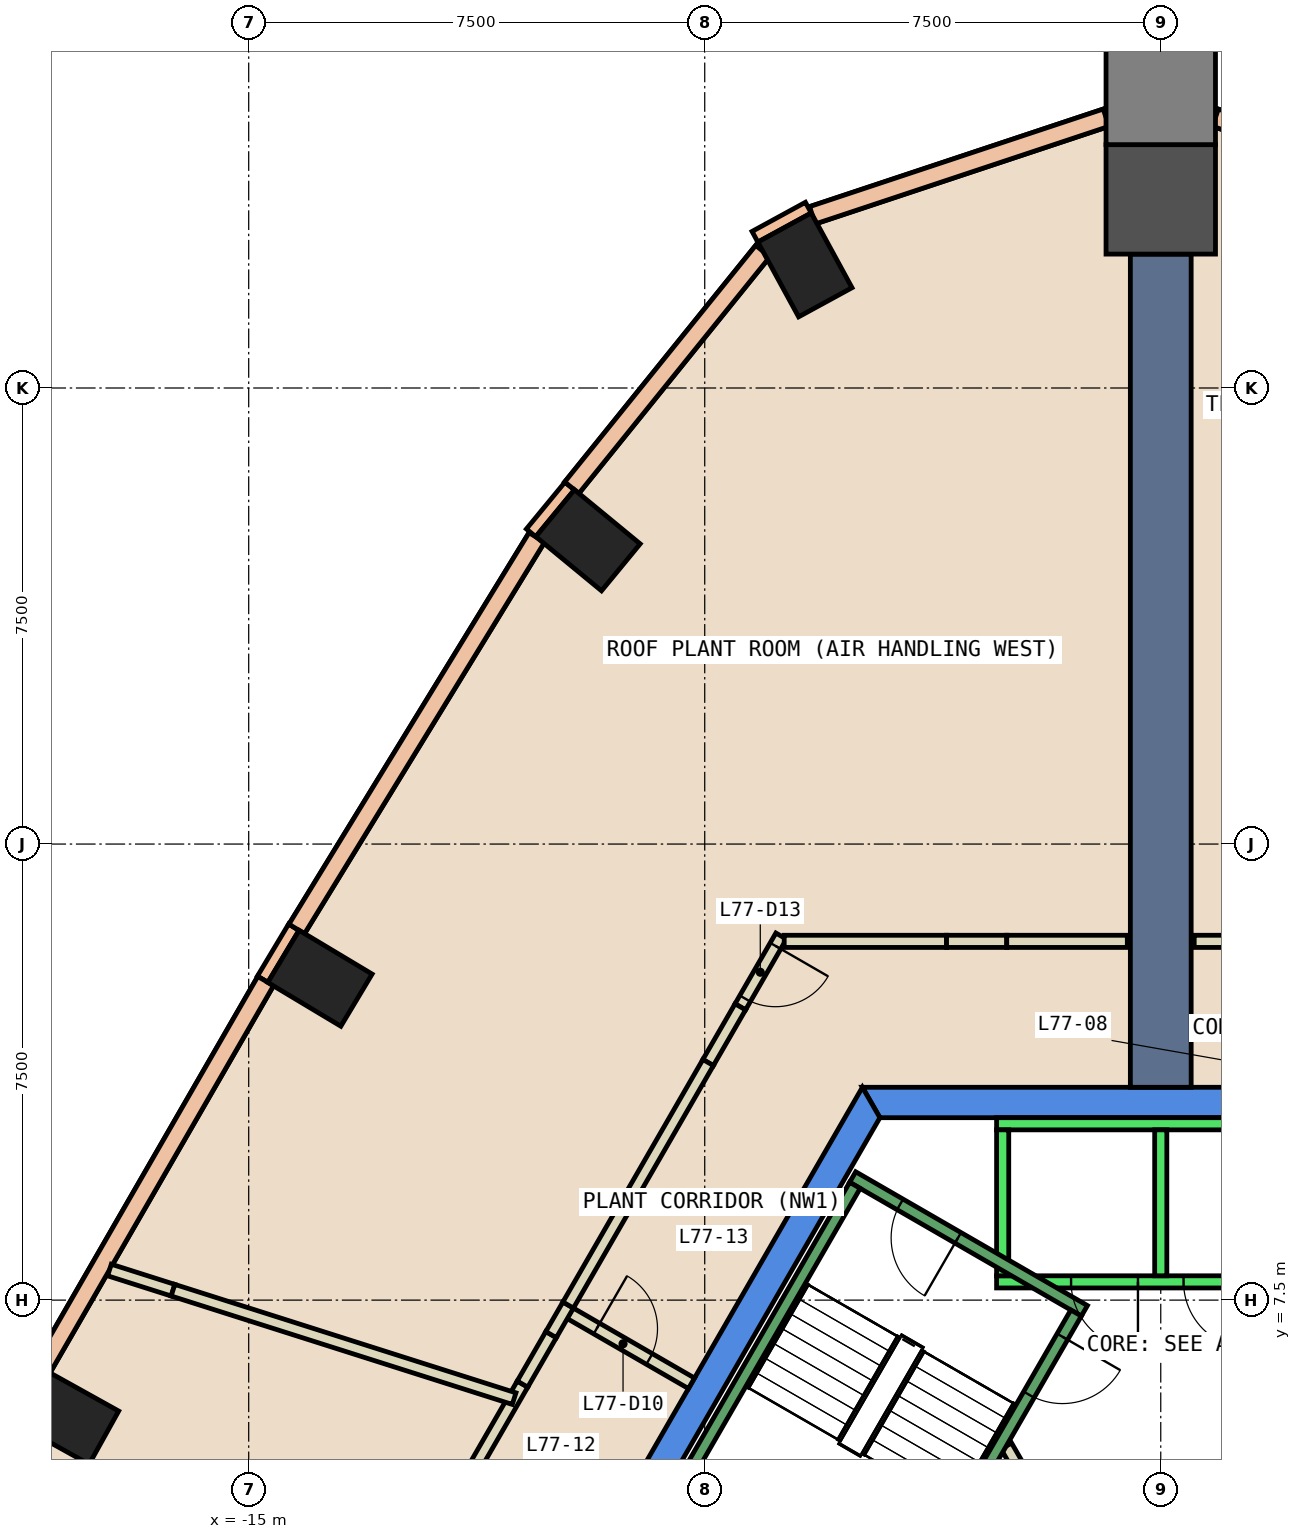
"""IFC4 building model, lengths in metres.
Left out: names, types, materials, properties, quantities, classifications, styles, units other than length and angle.
Written with IfcOpenShell. Run it as: python <this file> out.ifc"""

import sys

from ifc_helpers import new_model, si_unit, direction, frame, frame_2d, origin, origin_2d, place, context, subcontext, project, spatial, polyline, rectangle, outline, extrude, element, fill, save


model = new_model("IFC4")
c1 = context("Model", 3, precision=1e-05, world=origin(), true_north=direction((0.0, 1.0)))
c2 = subcontext(c1, "Body", "Model", "MODEL_VIEW")
j1 = project(units=[si_unit("LENGTHUNIT", "METRE"), si_unit("PLANEANGLEUNIT", "RADIAN")], contexts=[c1])
p1 = place(None, origin())
s1 = spatial("IfcSite", under=j1, at=p1, CompositionType="ELEMENT")
p2 = place(p1, origin())
s2 = spatial("IfcBuilding", under=s1, at=p2, CompositionType="ELEMENT")
p3 = place(p2, frame((0.0, 0.0, 326.0)))
s3 = spatial("IfcBuildingStorey", under=s2, at=p3, CompositionType="ELEMENT", Elevation=326.0)
p4 = place(p3, frame((0.0, 25.602, -0.6), z_axis=(0.0, 0.0, 1.0), x_axis=(0.0, 1.0, 0.0)))
e1 = element("IfcColumn", 1, at=p4, inside=s3, PredefinedType="COLUMN", context=c2, shape_type="SweptSolid", body=[
    extrude(rectangle(XDim=1.8, YDim=1.8, at=origin_2d()), origin(), (0.0, 0.0, 1.0), 5.55),
])
for number, where, z_axis, x_axis in (
    (2, (-5.852, 24.524, -0.6), (0.0, 0.0, 1.0), (0.878, 0.479, 0.0)),
    (3, (-9.42, 19.996, -0.6), (0.0, 0.0, 1.0), (0.636, 0.772, 0.0)),
    (4, (-13.828, 12.793, -0.6), (0.0, 0.0, 1.0), (0.514, 0.858, 0.0)),
    (5, (-17.993, 5.579, -0.6), (0.0, 0.0, 1.0), (0.486, 0.874, 0.0)),
):
    element("IfcColumn", number, at=place(p3, frame(where, z_axis=z_axis, x_axis=x_axis)), inside=s3, PredefinedType="COLUMN", context=c2, shape_type="SweptSolid", body=[
        extrude(rectangle(XDim=1.0, YDim=1.4, at=origin_2d()), origin(), (0.0, 0.0, 1.0), 5.55),
    ])
p5 = place(p3, frame((0.0, 27.402, -0.6), z_axis=(0.0, 0.0, 1.0), x_axis=(0.0, 1.0, 0.0)))
e6 = element("IfcColumn", 6, at=p5, inside=s3, PredefinedType="COLUMN", context=c2, shape_type="SweptSolid", body=[
    extrude(rectangle(XDim=1.8, YDim=1.8, at=origin_2d()), origin(), (0.0, 0.0, 1.0), 5.55),
])
p6 = place(p3, frame((0.0, 0.0, -0.6)))
e7 = element("IfcWall", 7, at=p6, inside=s3, PredefinedType="SHEAR", context=c2, shape_type="SweptSolid", body=[
    extrude(outline(polyline([(4.907, 11.0), (-4.907, 11.0), (-4.619, 10.5), (4.619, 10.5), (4.907, 11.0)])), origin(), (0.0, 0.0, 1.0), 5.55),
])
p7 = place(p3, frame((0.0, 0.0, -0.6)))
e8 = element("IfcWall", 8, at=p7, inside=s3, PredefinedType="SHEAR", context=c2, shape_type="SweptSolid", body=[
    extrude(outline(polyline([(-9.236, 3.502), (-8.803, 3.253), (-4.619, 10.5), (-4.907, 11.0), (-9.236, 3.502)])), origin(), (0.0, 0.0, 1.0), 5.55),
])
p8 = place(p3, frame((0.0, 11.0, 0.0), z_axis=(0.0, 0.0, 1.0), x_axis=(0.0, 1.0, 0.0)))
e9 = element("IfcWall", 9, at=p8, inside=s3, PredefinedType="SHEAR", context=c2, shape_type="SweptSolid", body=[
    extrude(rectangle(XDim=13.702, YDim=1.0, at=frame_2d((6.851, 0.0))), origin(), (0.0, 0.0, 1.0), 4.95),
])
for number, where, z_axis, x_axis in (
    (10, (-5.796, 25.466, 0.0), (0.0, 0.0, 1.0), (-0.878, -0.479, 0.0)),
    (11, (-9.72, 20.89, 0.0), (0.0, 0.0, 1.0), (-0.636, -0.772, 0.0)),
    (12, (-14.257, 13.634, 0.0), (0.0, 0.0, 1.0), (-0.514, -0.858, 0.0)),
):
    element("IfcWall", number, at=place(p3, frame(where, z_axis=z_axis, x_axis=x_axis)), inside=s3, PredefinedType="STANDARD", context=c2, shape_type="SweptSolid", body=[
        extrude(rectangle(XDim=1.0, YDim=0.2, at=frame_2d((0.5, 0.0))), origin(), (0.0, 0.0, 1.0), 4.95),
    ])
p9 = place(p3, frame((5.729, 25.34, 0.0), z_axis=(0.0, 0.0, 1.0), x_axis=(-0.948980274282, 0.315335438897, 0.0)))
e13 = element("IfcWall", 13, at=p9, inside=s3, PredefinedType="STANDARD", context=c2, shape_type="SweptSolid", body=[
    extrude(rectangle(XDim=5.09, YDim=0.3, at=frame_2d((2.545, 0.0))), origin(), (0.0, 0.0, 1.0), 1.2),
])
p10 = place(p3, frame((5.729, 25.34, 4.15), z_axis=(0.0, 0.0, 1.0), x_axis=(-0.948980274282, 0.315335438897, 0.0)))
e14 = element("IfcWall", 14, at=p10, inside=s3, PredefinedType="STANDARD", context=c2, shape_type="SweptSolid", body=[
    extrude(rectangle(XDim=5.09, YDim=0.3, at=frame_2d((2.545, 0.0))), origin(), (0.0, 0.0, 1.0), 0.8),
])
p11 = place(p3, frame((-0.899, 26.945, 0.0), z_axis=(0.0, 0.0, 1.0), x_axis=(-0.948980274282, -0.315335438897, 0.0)))
e15 = element("IfcWall", 15, at=p11, inside=s3, PredefinedType="STANDARD", context=c2, shape_type="SweptSolid", body=[
    extrude(rectangle(XDim=5.09, YDim=0.3, at=frame_2d((2.545, 0.0))), origin(), (0.0, 0.0, 1.0), 1.2),
])
p12 = place(p3, frame((-0.899, 26.945, 4.15), z_axis=(0.0, 0.0, 1.0), x_axis=(-0.948980274282, -0.315335438897, 0.0)))
e16 = element("IfcWall", 16, at=p12, inside=s3, PredefinedType="STANDARD", context=c2, shape_type="SweptSolid", body=[
    extrude(rectangle(XDim=5.09, YDim=0.3, at=frame_2d((2.545, 0.0))), origin(), (0.0, 0.0, 1.0), 0.8),
])
p13 = place(p3, frame((-6.545, 24.751, 0.0), z_axis=(0.0, 0.0, 1.0), x_axis=(-0.628249584672, -0.778011863251, 0.0)))
e17 = element("IfcWall", 17, at=p13, inside=s3, PredefinedType="STANDARD", context=c2, shape_type="SweptSolid", body=[
    extrude(rectangle(XDim=5.0, YDim=0.3, at=frame_2d((2.5, 0.0))), origin(), (0.0, 0.0, 1.0), 1.2),
])
p14 = place(p3, frame((-6.545, 24.751, 4.15), z_axis=(0.0, 0.0, 1.0), x_axis=(-0.628249584672, -0.778011863251, 0.0)))
e18 = element("IfcWall", 18, at=p14, inside=s3, PredefinedType="STANDARD", context=c2, shape_type="SweptSolid", body=[
    extrude(rectangle(XDim=5.0, YDim=0.3, at=frame_2d((2.5, 0.0))), origin(), (0.0, 0.0, 1.0), 0.8),
])
p15 = place(p3, frame((-10.262, 20.042, 0.0), z_axis=(0.0, 0.0, 1.0), x_axis=(-0.522767476235, -0.852475316822, 0.0)))
e19 = element("IfcWall", 19, at=p15, inside=s3, PredefinedType="STANDARD", context=c2, shape_type="SweptSolid", body=[
    extrude(rectangle(XDim=7.552, YDim=0.3, at=frame_2d((3.776, 0.0))), origin(), (0.0, 0.0, 1.0), 1.2),
])
p16 = place(p3, frame((-10.262, 20.042, 4.15), z_axis=(0.0, 0.0, 1.0), x_axis=(-0.522767476235, -0.852475316822, 0.0)))
e20 = element("IfcWall", 20, at=p16, inside=s3, PredefinedType="STANDARD", context=c2, shape_type="SweptSolid", body=[
    extrude(rectangle(XDim=7.552, YDim=0.3, at=frame_2d((3.776, 0.0))), origin(), (0.0, 0.0, 1.0), 0.8),
])
p17 = place(p3, frame((-14.721, 12.747, 0.0), z_axis=(0.0, 0.0, 1.0), x_axis=(-0.499904379019, -0.866080603545, 0.0)))
e21 = element("IfcWall", 21, at=p17, inside=s3, PredefinedType="STANDARD", context=c2, shape_type="SweptSolid", body=[
    extrude(rectangle(XDim=7.357, YDim=0.3, at=frame_2d((3.679, 0.0))), origin(), (0.0, 0.0, 1.0), 1.2),
])
p18 = place(p3, frame((-14.721, 12.747, 4.15), z_axis=(0.0, 0.0, 1.0), x_axis=(-0.499904379019, -0.866080603545, 0.0)))
e22 = element("IfcWall", 22, at=p18, inside=s3, PredefinedType="STANDARD", context=c2, shape_type="SweptSolid", body=[
    extrude(rectangle(XDim=7.357, YDim=0.3, at=frame_2d((3.679, 0.0))), origin(), (0.0, 0.0, 1.0), 0.8),
])
p19 = place(p3, frame((-2.54, 5.1, 0.0), z_axis=(0.0, 0.0, 1.0), x_axis=(0.499925051871, -0.866068670783, 0.0)))
e23 = element("IfcWall", 23, at=p19, inside=s3, PredefinedType="PARTITIONING", context=c2, shape_type="SweptSolid", body=[
    extrude(rectangle(XDim=5.181, YDim=0.2, at=frame_2d((2.59, 0.0))), origin(), (0.0, 0.0, 1.0), 4.95),
])
p20 = place(p19, frame((2.04, 0.0, 0.0)))
e24 = element("IfcOpeningElement", 24, at=p20, cuts=e23, PredefinedType="OPENING", context=c2, shape_type="SweptSolid", body=[
    extrude(rectangle(XDim=1.0, YDim=2.1, at=frame_2d((0.5, 1.05))), frame((0.0, 0.11, 0.0), z_axis=(0.0, -1.0, 0.0), x_axis=(1.0, 0.0, 0.0)), (0.0, 0.0, 1.0), 0.22),
])
p21 = place(p3, frame((0.55, 13.4, 0.0), z_axis=(0.0, 0.0, 1.0), x_axis=(1.0, 0.0, 0.0)))
e25 = element("IfcWall", 25, at=p21, inside=s3, PredefinedType="PARTITIONING", context=c2, shape_type="SweptSolid", body=[
    extrude(rectangle(XDim=2.971, YDim=0.2, at=frame_2d((1.485, 0.0))), origin(), (0.0, 0.0, 1.0), 4.95),
])
p22 = place(p21, frame((1.35, 0.0, 0.0)))
e26 = element("IfcOpeningElement", 26, at=p22, cuts=e25, PredefinedType="OPENING", context=c2, shape_type="SweptSolid", body=[
    extrude(rectangle(XDim=1.0, YDim=2.1, at=frame_2d((0.5, 1.05))), frame((0.0, 0.11, 0.0), z_axis=(0.0, -1.0, 0.0), x_axis=(1.0, 0.0, 0.0)), (0.0, 0.0, 1.0), 0.22),
])
p23 = place(p3, frame((0.0, 26.522, 0.0), z_axis=(0.0, 0.0, 1.0), x_axis=(0.0, 1.0, 0.0)))
e27 = element("IfcWall", 27, at=p23, inside=s3, PredefinedType="PARTITIONING", context=c2, shape_type="SweptSolid", body=[
    extrude(rectangle(XDim=0.501, YDim=0.2, at=frame_2d((0.25, 0.0))), origin(), (0.0, 0.0, 1.0), 4.95),
])
p24 = place(p3, frame((-9.796, 7.332, 0.0), z_axis=(0.0, 0.0, 1.0), x_axis=(0.865973769406, -0.500089422704, 0.0)))
e28 = element("IfcWall", 28, at=p24, inside=s3, PredefinedType="PARTITIONING", context=c2, shape_type="SweptSolid", body=[
    extrude(rectangle(XDim=2.399, YDim=0.2, at=frame_2d((1.2, 0.0))), origin(), (0.0, 0.0, 1.0), 4.95),
])
p25 = place(p24, frame((0.6, 0.0, 0.0)))
e29 = element("IfcOpeningElement", 29, at=p25, cuts=e28, PredefinedType="OPENING", context=c2, shape_type="SweptSolid", body=[
    extrude(rectangle(XDim=1.0, YDim=2.1, at=frame_2d((0.5, 1.05))), frame((0.0, 0.11, 0.0), z_axis=(0.0, -1.0, 0.0), x_axis=(1.0, 0.0, 0.0)), (0.0, 0.0, 1.0), 0.22),
])
p26 = place(p3, frame((-6.243, 13.487, 0.0), z_axis=(0.0, 0.0, 1.0), x_axis=(-0.500026415507, -0.866010152247, 0.0)))
e30 = element("IfcWall", 30, at=p26, inside=s3, PredefinedType="PARTITIONING", context=c2, shape_type="SweptSolid", body=[
    extrude(rectangle(XDim=1.344, YDim=0.2, at=frame_2d((0.672, 0.0))), origin(), (0.0, 0.0, 1.0), 4.95),
])
p27 = place(p26, frame((0.187, 0.0, 0.0)))
e31 = element("IfcOpeningElement", 31, at=p27, cuts=e30, PredefinedType="OPENING", context=c2, shape_type="SweptSolid", body=[
    extrude(rectangle(XDim=1.0, YDim=2.1, at=frame_2d((0.5, 1.05))), frame((0.0, 0.11, 0.0), z_axis=(0.0, -1.0, 0.0), x_axis=(1.0, 0.0, 0.0)), (0.0, 0.0, 1.0), 0.22),
])
p28 = place(p3, frame((-6.193, 13.4, 0.0), z_axis=(0.0, 0.0, 1.0), x_axis=(1.0, 0.0, 0.0)))
e32 = element("IfcWall", 32, at=p28, inside=s3, PredefinedType="PARTITIONING", context=c2, shape_type="SweptSolid", body=[
    extrude(rectangle(XDim=2.67, YDim=0.2, at=frame_2d((1.335, 0.0))), origin(), (0.0, 0.0, 1.0), 4.95),
])
p29 = place(p3, frame((-17.29, 7.995, 0.0), z_axis=(0.0, 0.0, 1.0), x_axis=(0.953042685806, -0.302835993621, 0.0)))
e33 = element("IfcWall", 33, at=p29, inside=s3, PredefinedType="PARTITIONING", context=c2, shape_type="SweptSolid", body=[
    extrude(rectangle(XDim=1.096, YDim=0.2, at=frame_2d((0.548, 0.0))), origin(), (0.0, 0.0, 1.0), 2.55),
])
p30 = place(p3, frame((-13.041, 1.711, 0.0), z_axis=(0.0, 0.0, 1.0), x_axis=(0.499853954338, 0.866109706869, 0.0)))
e34 = element("IfcWall", 34, at=p30, inside=s3, PredefinedType="PARTITIONING", context=c2, shape_type="SweptSolid", body=[
    extrude(rectangle(XDim=5.089, YDim=0.2, at=frame_2d((2.545, 0.0))), origin(), (0.0, 0.0, 1.0), 4.95),
])
p31 = place(p30, frame((1.533, 0.0, 0.0)))
e35 = element("IfcOpeningElement", 35, at=p31, cuts=e34, PredefinedType="OPENING", context=c2, shape_type="SweptSolid", body=[
    extrude(rectangle(XDim=1.0, YDim=2.1, at=frame_2d((0.5, 1.05))), frame((0.0, 0.11, 0.0), z_axis=(0.0, -1.0, 0.0), x_axis=(1.0, 0.0, 0.0)), (0.0, 0.0, 1.0), 0.22),
])
p32 = place(p3, frame((-10.497, 6.119, 0.0), z_axis=(0.0, 0.0, 1.0), x_axis=(0.499909789979, 0.8660774803, 0.0)))
e36 = element("IfcWall", 36, at=p32, inside=s3, PredefinedType="PARTITIONING", context=c2, shape_type="SweptSolid", body=[
    extrude(rectangle(XDim=0.94, YDim=0.2, at=frame_2d((0.47, 0.0))), origin(), (0.0, 0.0, 1.0), 2.55),
])
p33 = place(p3, frame((-10.027, 6.933, 0.0), z_axis=(0.0, 0.0, 1.0), x_axis=(0.500676140182, 0.865634681983, 0.0)))
e37 = element("IfcWall", 37, at=p33, inside=s3, PredefinedType="PARTITIONING", context=c2, shape_type="SweptSolid", body=[
    extrude(rectangle(XDim=0.561, YDim=0.2, at=frame_2d((0.281, 0.0))), origin(), (0.0, 0.0, 1.0), 4.95),
])
p34 = place(p3, frame((-6.915, 12.323, 0.0), z_axis=(0.0, 0.0, 1.0), x_axis=(-0.500135319504, -0.865947262935, 0.0)))
e38 = element("IfcWall", 38, at=p34, inside=s3, PredefinedType="PARTITIONING", context=c2, shape_type="SweptSolid", body=[
    extrude(rectangle(XDim=1.058, YDim=0.2, at=frame_2d((0.529, 0.0))), origin(), (0.0, 0.0, 1.0), 2.55),
])
p35 = place(p3, frame((-7.444, 11.407, 0.0), z_axis=(0.0, 0.0, 1.0), x_axis=(-0.499919806806, -0.866071698396, 0.0)))
e39 = element("IfcWall", 39, at=p35, inside=s3, PredefinedType="PARTITIONING", context=c2, shape_type="SweptSolid", body=[
    extrude(rectangle(XDim=4.605, YDim=0.2, at=frame_2d((2.302, 0.0))), origin(), (0.0, 0.0, 1.0), 4.95),
])
p36 = place(p3, frame((-3.523, 13.4, 0.0), z_axis=(0.0, 0.0, 1.0), x_axis=(1.0, 0.0, 0.0)))
e40 = element("IfcWall", 40, at=p36, inside=s3, PredefinedType="PARTITIONING", context=c2, shape_type="SweptSolid", body=[
    extrude(rectangle(XDim=0.99, YDim=0.2, at=frame_2d((0.495, 0.0))), origin(), (0.0, 0.0, 1.0), 2.55),
])
p37 = place(p3, frame((-2.533, 13.4, 0.0), z_axis=(0.0, 0.0, 1.0), x_axis=(1.0, 0.0, 0.0)))
e41 = element("IfcWall", 41, at=p37, inside=s3, PredefinedType="PARTITIONING", context=c2, shape_type="SweptSolid", body=[
    extrude(rectangle(XDim=1.983, YDim=0.2, at=frame_2d((0.991, 0.0))), origin(), (0.0, 0.0, 1.0), 4.95),
])
p38 = place(p3, frame((-16.245, 7.663, 0.0), z_axis=(0.0, 0.0, 1.0), x_axis=(0.953015609999, -0.302921189583, 0.0)))
e42 = element("IfcWall", 42, at=p38, inside=s3, PredefinedType="PARTITIONING", context=c2, shape_type="SweptSolid", body=[
    extrude(rectangle(XDim=5.887, YDim=0.2, at=frame_2d((2.943, 0.0))), origin(), (0.0, 0.0, 1.0), 4.95),
])
p39 = place(p3, frame((2.7, 7.8, 0.0), z_axis=(0.0, 0.0, 1.0), x_axis=(-1.0, 0.0, 0.0)))
e43 = element("IfcWall", 43, at=p39, inside=s3, PredefinedType="STANDARD", context=c2, shape_type="SweptSolid", body=[
    extrude(rectangle(XDim=5.4, YDim=0.2, at=frame_2d((2.7, 0.0))), origin(), (0.0, 0.0, 1.0), 4.95),
])
p40 = place(p39, frame((1.225, 0.0, 0.0)))
e44 = element("IfcOpeningElement", 44, at=p40, cuts=e43, PredefinedType="OPENING", context=c2, shape_type="SweptSolid", body=[
    extrude(rectangle(XDim=1.1, YDim=2.1, at=frame_2d((0.55, 1.05))), frame((0.0, 0.11, 0.0), z_axis=(0.0, -1.0, 0.0), x_axis=(1.0, 0.0, 0.0)), (0.0, 0.0, 1.0), 0.22),
])
p41 = place(p39, frame((3.075, 0.0, 0.0)))
e45 = element("IfcOpeningElement", 45, at=p41, cuts=e43, PredefinedType="OPENING", context=c2, shape_type="SweptSolid", body=[
    extrude(rectangle(XDim=1.1, YDim=2.1, at=frame_2d((0.55, 1.05))), frame((0.0, 0.11, 0.0), z_axis=(0.0, -1.0, 0.0), x_axis=(1.0, 0.0, 0.0)), (0.0, 0.0, 1.0), 0.22),
])
p42 = place(p3, frame((2.7, 10.4, 0.0), z_axis=(0.0, 0.0, 1.0), x_axis=(-1.0, 0.0, 0.0)))
e46 = element("IfcWall", 46, at=p42, inside=s3, PredefinedType="STANDARD", context=c2, shape_type="SweptSolid", body=[
    extrude(rectangle(XDim=5.4, YDim=0.2, at=frame_2d((2.7, 0.0))), origin(), (0.0, 0.0, 1.0), 4.95),
])
for number, where, z_axis, x_axis in (
    (47, (0.0, 7.9, 0.0), (0.0, 0.0, 1.0), (0.0, 1.0, 0.0)),
    (48, (-2.6, 7.9, 0.0), (0.0, 0.0, 1.0), (0.0, 1.0, 0.0)),
):
    element("IfcWall", number, at=place(p3, frame(where, z_axis=z_axis, x_axis=x_axis)), inside=s3, PredefinedType="STANDARD", context=c2, shape_type="SweptSolid", body=[
        extrude(rectangle(XDim=2.4, YDim=0.2, at=frame_2d((1.2, 0.0))), origin(), (0.0, 0.0, 1.0), 4.95),
    ])
p43 = place(p3, frame((-1.256, 7.324, 0.0), z_axis=(0.0, 0.0, 1.0), x_axis=(-0.866046073146, 0.499964197906, 0.0)))
e49 = element("IfcWall", 49, at=p43, inside=s3, PredefinedType="STANDARD", context=c2, shape_type="SweptSolid", body=[
    extrude(rectangle(XDim=4.4, YDim=0.2, at=frame_2d((2.2, 0.0))), origin(), (0.0, 0.0, 1.0), 4.95),
])
p44 = place(p43, frame((2.4, 0.0, 0.0)))
e50 = element("IfcOpeningElement", 50, at=p44, cuts=e49, PredefinedType="OPENING", context=c2, shape_type="SweptSolid", body=[
    extrude(rectangle(XDim=1.1, YDim=2.2, at=frame_2d((0.55, 1.1))), frame((0.0, 0.11, 0.0), z_axis=(0.0, -1.0, 0.0), x_axis=(1.0, 0.0, 0.0)), (0.0, 0.0, 1.0), 0.22),
])
p45 = place(p3, frame((-1.393, 7.288, 0.0), z_axis=(0.0, 0.0, 1.0), x_axis=(-0.499963383562, -0.866046543262, 0.0)))
e51 = element("IfcWall", 51, at=p45, inside=s3, PredefinedType="STANDARD", context=c2, shape_type="SweptSolid", body=[
    extrude(rectangle(XDim=6.9, YDim=0.2, at=frame_2d((3.45, 0.0))), origin(), (0.0, 0.0, 1.0), 4.95),
])
p46 = place(p45, frame((0.45, 0.0, 0.0)))
e52 = element("IfcOpeningElement", 52, at=p46, cuts=e51, PredefinedType="OPENING", context=c2, shape_type="SweptSolid", body=[
    extrude(rectangle(XDim=1.1, YDim=2.2, at=frame_2d((0.55, 1.1))), frame((0.0, 0.11, 0.0), z_axis=(0.0, -1.0, 0.0), x_axis=(1.0, 0.0, 0.0)), (0.0, 0.0, 1.0), 0.22),
])
p47 = place(p3, frame((-5.03, 9.388, 0.0), z_axis=(0.0, 0.0, 1.0), x_axis=(-0.499978703459, -0.866037698999, 0.0)))
e53 = element("IfcWall", 53, at=p47, inside=s3, PredefinedType="STANDARD", context=c2, shape_type="SweptSolid", body=[
    extrude(rectangle(XDim=6.9, YDim=0.2, at=frame_2d((3.45, 0.0))), origin(), (0.0, 0.0, 1.0), 4.95),
])
p48 = place(p25, origin())
e54 = element("IfcDoor", 54, at=p48, inside=s3, OperationType="SINGLE_SWING_LEFT", PredefinedType="DOOR", context=c2, shape_type="SweptSolid", body=[
    extrude(rectangle(XDim=1.0, YDim=2.1, at=frame_2d((0.5, 1.05))), frame((0.0, 0.025, 0.0), z_axis=(0.0, -1.0, 0.0), x_axis=(1.0, 0.0, 0.0)), (0.0, 0.0, 1.0), 0.05),
])
fill(e29, e54)
p49 = place(p27, origin())
e55 = element("IfcDoor", 55, at=p49, inside=s3, OperationType="SINGLE_SWING_RIGHT", PredefinedType="DOOR", context=c2, shape_type="SweptSolid", body=[
    extrude(rectangle(XDim=1.0, YDim=2.1, at=frame_2d((0.5, 1.05))), frame((0.0, 0.025, 0.0), z_axis=(0.0, -1.0, 0.0), x_axis=(1.0, 0.0, 0.0)), (0.0, 0.0, 1.0), 0.05),
])
fill(e31, e55)
p50 = place(p40, origin())
e56 = element("IfcDoor", 56, at=p50, inside=s3, OperationType="SLIDING_TO_LEFT", PredefinedType="DOOR", context=c2, shape_type="SweptSolid", body=[
    extrude(rectangle(XDim=1.1, YDim=2.1, at=frame_2d((0.55, 1.05))), frame((0.0, 0.025, 0.0), z_axis=(0.0, -1.0, 0.0), x_axis=(1.0, 0.0, 0.0)), (0.0, 0.0, 1.0), 0.05),
])
fill(e44, e56)
p51 = place(p41, origin())
e57 = element("IfcDoor", 57, at=p51, inside=s3, OperationType="SLIDING_TO_LEFT", PredefinedType="DOOR", context=c2, shape_type="SweptSolid", body=[
    extrude(rectangle(XDim=1.1, YDim=2.1, at=frame_2d((0.55, 1.05))), frame((0.0, 0.025, 0.0), z_axis=(0.0, -1.0, 0.0), x_axis=(1.0, 0.0, 0.0)), (0.0, 0.0, 1.0), 0.05),
])
fill(e45, e57)
p52 = place(p46, origin())
e58 = element("IfcDoor", 58, at=p52, inside=s3, OperationType="SINGLE_SWING_LEFT", PredefinedType="DOOR", context=c2, shape_type="SweptSolid", body=[
    extrude(rectangle(XDim=1.1, YDim=2.2, at=frame_2d((0.55, 1.1))), frame((0.0, 0.025, 0.0), z_axis=(0.0, -1.0, 0.0), x_axis=(1.0, 0.0, 0.0)), (0.0, 0.0, 1.0), 0.05),
])
fill(e52, e58)
p53 = place(p44, origin())
e59 = element("IfcDoor", 59, at=p53, inside=s3, OperationType="SINGLE_SWING_LEFT", PredefinedType="DOOR", context=c2, shape_type="SweptSolid", body=[
    extrude(rectangle(XDim=1.1, YDim=2.2, at=frame_2d((0.55, 1.1))), frame((0.0, 0.025, 0.0), z_axis=(0.0, -1.0, 0.0), x_axis=(1.0, 0.0, 0.0)), (0.0, 0.0, 1.0), 0.05),
])
fill(e50, e59)
save(model, sys.argv[1])
